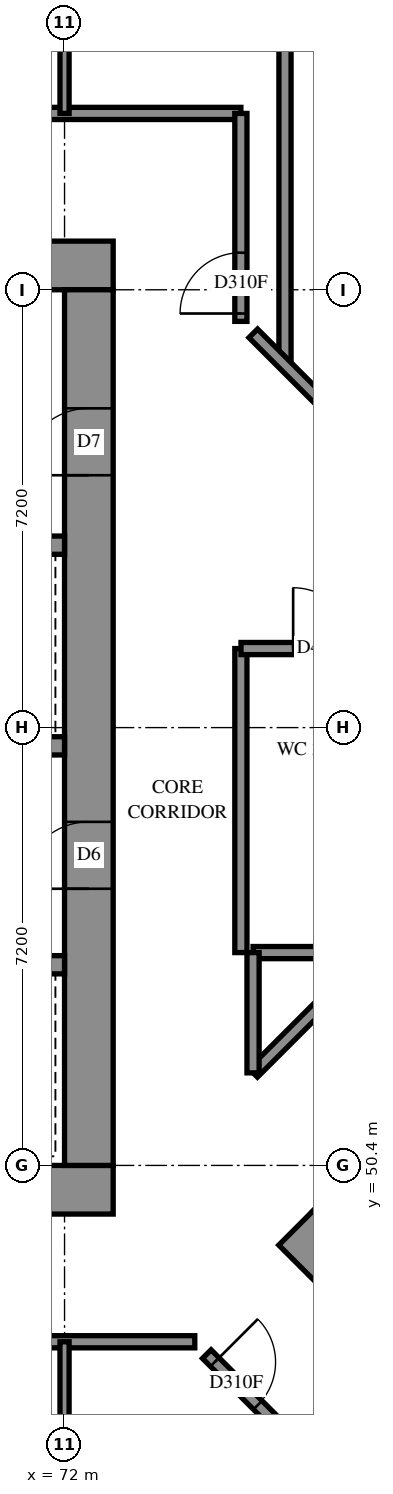
"""IFC4 building model, lengths in metres.
Left out: names, types, materials, properties, quantities, classifications, styles, units other than length and angle.
Written with IfcOpenShell. Run it as: python <this file> out.ifc"""

import sys

from ifc_helpers import new_model, si_unit, direction, frame, frame_2d, origin, place, context, subcontext, project, spatial, rectangle, extrude, element, fill, save


model = new_model("IFC4")
c1 = context("Model", 3, precision=1e-05, world=origin(), true_north=direction((0.0, 1.0)))
c2 = subcontext(c1, "Body", "Model", "MODEL_VIEW")
j1 = project(units=[si_unit("LENGTHUNIT", "METRE"), si_unit("PLANEANGLEUNIT", "RADIAN")], contexts=[c1])
p1 = place(None, origin())
s1 = spatial("IfcSite", under=j1, at=p1, CompositionType="ELEMENT")
p2 = place(p1, origin())
s2 = spatial("IfcBuilding", under=s1, at=p2, CompositionType="ELEMENT")
p3 = place(p2, frame((0.0, 0.0, 118.6)))
s3 = spatial("IfcBuildingStorey", under=s2, at=p3, CompositionType="ELEMENT", Elevation=118.6)
p4 = place(p3, frame((56.8, 50.0, -0.3), z_axis=(0.0, 0.0, 1.0), x_axis=(1.0, 0.0, 0.0)))
e1 = element("IfcWall", 1, at=p4, inside=s3, PredefinedType="SHEAR", context=c2, shape_type="SweptSolid", body=[
    extrude(rectangle(XDim=16.0, YDim=0.8, at=frame_2d((8.0, 0.0))), origin(), (0.0, 0.0, 1.0), 2.7),
])
p5 = place(p3, frame((56.8, 65.2, -0.3), z_axis=(0.0, 0.0, 1.0), x_axis=(1.0, 0.0, 0.0)))
e2 = element("IfcWall", 2, at=p5, inside=s3, PredefinedType="SHEAR", context=c2, shape_type="SweptSolid", body=[
    extrude(rectangle(XDim=16.0, YDim=0.8, at=frame_2d((8.0, 0.0))), origin(), (0.0, 0.0, 1.0), 2.7),
])
p6 = place(p5, frame((10.8, 0.0, 0.3)))
e3 = element("IfcOpeningElement", 3, at=p6, cuts=e2, PredefinedType="OPENING", context=c2, shape_type="SweptSolid", body=[
    extrude(rectangle(XDim=0.8, YDim=2.1, at=frame_2d((0.4, 1.05))), frame((0.0, 0.41, 0.0), z_axis=(0.0, -1.0, 0.0), x_axis=(1.0, 0.0, 0.0)), (0.0, 0.0, 1.0), 0.82),
])
p7 = place(p3, frame((72.4, 50.4, -0.3), z_axis=(0.0, 0.0, 1.0), x_axis=(0.0, 1.0, 0.0)))
e4 = element("IfcWall", 4, at=p7, inside=s3, PredefinedType="SHEAR", context=c2, shape_type="SweptSolid", body=[
    extrude(rectangle(XDim=14.4, YDim=0.8, at=frame_2d((7.2, 0.0))), origin(), (0.0, 0.0, 1.0), 2.7),
])
p8 = place(p7, frame((4.55, 0.0, 0.3)))
e5 = element("IfcOpeningElement", 5, at=p8, cuts=e4, PredefinedType="OPENING", context=c2, shape_type="SweptSolid", body=[
    extrude(rectangle(XDim=1.1, YDim=2.1, at=frame_2d((0.55, 1.05))), frame((0.0, 0.41, 0.0), z_axis=(0.0, -1.0, 0.0), x_axis=(1.0, 0.0, 0.0)), (0.0, 0.0, 1.0), 0.82),
])
p9 = place(p7, frame((11.35, 0.0, 0.3)))
e6 = element("IfcOpeningElement", 6, at=p9, cuts=e4, PredefinedType="OPENING", context=c2, shape_type="SweptSolid", body=[
    extrude(rectangle(XDim=1.1, YDim=2.1, at=frame_2d((0.55, 1.05))), frame((0.0, 0.41, 0.0), z_axis=(0.0, -1.0, 0.0), x_axis=(1.0, 0.0, 0.0)), (0.0, 0.0, 1.0), 0.82),
])
p10 = place(p3, frame((57.6, 53.7, 0.0), z_axis=(0.0, 0.0, 1.0), x_axis=(1.0, 0.0, 0.0)))
e7 = element("IfcWall", 7, at=p10, inside=s3, PredefinedType="SOLIDWALL", context=c2, shape_type="SweptSolid", body=[
    extrude(rectangle(XDim=14.4, YDim=0.3, at=frame_2d((7.2, 0.0))), origin(), (0.0, 0.0, 1.0), 3.1),
])
p11 = place(p10, frame((1.25, 0.0, 0.0)))
e8 = element("IfcOpeningElement", 8, at=p11, cuts=e7, PredefinedType="OPENING", context=c2, shape_type="SweptSolid", body=[
    extrude(rectangle(XDim=1.1, YDim=2.1, at=frame_2d((0.55, 1.05))), frame((0.0, 0.16, 0.0), z_axis=(0.0, -1.0, 0.0), x_axis=(1.0, 0.0, 0.0)), (0.0, 0.0, 1.0), 0.32),
])
p12 = place(p10, frame((4.85, 0.0, 0.0)))
e9 = element("IfcOpeningElement", 9, at=p12, cuts=e7, PredefinedType="OPENING", context=c2, shape_type="SweptSolid", body=[
    extrude(rectangle(XDim=1.1, YDim=2.1, at=frame_2d((0.55, 1.05))), frame((0.0, 0.16, 0.0), z_axis=(0.0, -1.0, 0.0), x_axis=(1.0, 0.0, 0.0)), (0.0, 0.0, 1.0), 0.32),
])
p13 = place(p10, frame((8.45, 0.0, 0.0)))
e10 = element("IfcOpeningElement", 10, at=p13, cuts=e7, PredefinedType="OPENING", context=c2, shape_type="SweptSolid", body=[
    extrude(rectangle(XDim=1.1, YDim=2.1, at=frame_2d((0.55, 1.05))), frame((0.0, 0.16, 0.0), z_axis=(0.0, -1.0, 0.0), x_axis=(1.0, 0.0, 0.0)), (0.0, 0.0, 1.0), 0.32),
])
p14 = place(p10, frame((12.05, 0.0, 0.0)))
e11 = element("IfcOpeningElement", 11, at=p14, cuts=e7, PredefinedType="OPENING", context=c2, shape_type="SweptSolid", body=[
    extrude(rectangle(XDim=1.1, YDim=2.1, at=frame_2d((0.55, 1.05))), frame((0.0, 0.16, 0.0), z_axis=(0.0, -1.0, 0.0), x_axis=(1.0, 0.0, 0.0)), (0.0, 0.0, 1.0), 0.32),
])
p15 = place(p3, frame((57.6, 57.3, 0.0), z_axis=(0.0, 0.0, 1.0), x_axis=(1.0, 0.0, 0.0)))
e12 = element("IfcWall", 12, at=p15, inside=s3, PredefinedType="SOLIDWALL", context=c2, shape_type="SweptSolid", body=[
    extrude(rectangle(XDim=14.4, YDim=0.3, at=frame_2d((7.2, 0.0))), origin(), (0.0, 0.0, 1.0), 3.1),
])
p16 = place(p15, frame((12.05, 0.0, 0.0)))
e13 = element("IfcOpeningElement", 13, at=p16, cuts=e12, PredefinedType="OPENING", context=c2, shape_type="SweptSolid", body=[
    extrude(rectangle(XDim=1.1, YDim=2.1, at=frame_2d((0.55, 1.05))), frame((0.0, 0.16, 0.0), z_axis=(0.0, -1.0, 0.0), x_axis=(1.0, 0.0, 0.0)), (0.0, 0.0, 1.0), 0.32),
])
p17 = place(p3, frame((64.8, 60.6, 0.0), z_axis=(0.0, 0.0, 1.0), x_axis=(1.0, 0.0, 0.0)))
e14 = element("IfcWall", 14, at=p17, inside=s3, PredefinedType="SOLIDWALL", context=c2, shape_type="SweptSolid", body=[
    extrude(rectangle(XDim=7.2, YDim=0.3, at=frame_2d((3.6, 0.0))), origin(), (0.0, 0.0, 1.0), 3.1),
])
p18 = place(p3, frame((75.806, 49.373, -0.3), z_axis=(0.0, 0.0, 1.0), x_axis=(0.7071067812, -0.7071067812, 0.0)))
e15 = element("IfcWall", 15, at=p18, inside=s3, PredefinedType="SHEAR", context=c2, shape_type="SweptSolid", body=[
    extrude(rectangle(XDim=16.0, YDim=0.8, at=frame_2d((8.0, 0.0))), origin(), (0.0, 0.0, 1.0), 2.7),
])
p19 = place(p3, frame((76.372, 49.373, -0.3), z_axis=(0.0, 0.0, 1.0), x_axis=(0.7071067812, 0.7071067812, 0.0)))
e16 = element("IfcWall", 16, at=p19, inside=s3, PredefinedType="SHEAR", context=c2, shape_type="SweptSolid", body=[
    extrude(rectangle(XDim=14.4, YDim=0.8, at=frame_2d((7.2, 0.0))), origin(), (0.0, 0.0, 1.0), 2.7),
])
p20 = place(p19, frame((4.55, 0.0, 0.3)))
e17 = element("IfcOpeningElement", 17, at=p20, cuts=e16, PredefinedType="OPENING", context=c2, shape_type="SweptSolid", body=[
    extrude(rectangle(XDim=1.1, YDim=2.1, at=frame_2d((0.55, 1.05))), frame((0.0, 0.41, 0.0), z_axis=(0.0, -1.0, 0.0), x_axis=(1.0, 0.0, 0.0)), (0.0, 0.0, 1.0), 0.82),
])
p21 = place(p19, frame((11.35, 0.0, 0.3)))
e18 = element("IfcOpeningElement", 18, at=p21, cuts=e16, PredefinedType="OPENING", context=c2, shape_type="SweptSolid", body=[
    extrude(rectangle(XDim=1.1, YDim=2.1, at=frame_2d((0.55, 1.05))), frame((0.0, 0.41, 0.0), z_axis=(0.0, -1.0, 0.0), x_axis=(1.0, 0.0, 0.0)), (0.0, 0.0, 1.0), 0.82),
])
p22 = place(p3, frame((54.7, 67.7, 0.0), z_axis=(0.0, 0.0, 1.0), x_axis=(1.0, 0.0, 0.0)))
e19 = element("IfcWall", 19, at=p22, inside=s3, PredefinedType="PARTITIONING", context=c2, shape_type="SweptSolid", body=[
    extrude(rectangle(XDim=20.2, YDim=0.2, at=frame_2d((10.1, 0.0))), origin(), (0.0, 0.0, 1.0), 3.1),
])
p23 = place(p22, frame((5.2, 0.0, 0.0)))
e20 = element("IfcOpeningElement", 20, at=p23, cuts=e19, PredefinedType="OPENING", context=c2, shape_type="SweptSolid", body=[
    extrude(rectangle(XDim=0.9, YDim=2.1, at=frame_2d((0.45, 1.05))), frame((0.0, 0.11, 0.0), z_axis=(0.0, -1.0, 0.0), x_axis=(1.0, 0.0, 0.0)), (0.0, 0.0, 1.0), 0.22),
])
p24 = place(p22, frame((8.838, 0.0, 0.0)))
e21 = element("IfcOpeningElement", 21, at=p24, cuts=e19, PredefinedType="OPENING", context=c2, shape_type="SweptSolid", body=[
    extrude(rectangle(XDim=1.0, YDim=2.1, at=frame_2d((0.5, 1.05))), frame((0.0, 0.11, 0.0), z_axis=(0.0, -1.0, 0.0), x_axis=(1.0, 0.0, 0.0)), (0.0, 0.0, 1.0), 0.22),
])
p25 = place(p22, frame((14.1, 0.0, 0.0)))
e22 = element("IfcOpeningElement", 22, at=p25, cuts=e19, PredefinedType="OPENING", context=c2, shape_type="SweptSolid", body=[
    extrude(rectangle(XDim=0.9, YDim=2.1, at=frame_2d((0.45, 1.05))), frame((0.0, 0.11, 0.0), z_axis=(0.0, -1.0, 0.0), x_axis=(1.0, 0.0, 0.0)), (0.0, 0.0, 1.0), 0.22),
])
p26 = place(p3, frame((54.7, 47.5, 0.0), z_axis=(0.0, 0.0, 1.0), x_axis=(1.0, 0.0, 0.0)))
e23 = element("IfcWall", 23, at=p26, inside=s3, PredefinedType="PARTITIONING", context=c2, shape_type="SweptSolid", body=[
    extrude(rectangle(XDim=19.442, YDim=0.2, at=frame_2d((9.721, 0.0))), origin(), (0.0, 0.0, 1.0), 3.1),
])
p27 = place(p26, frame((5.2, 0.0, 0.0)))
e24 = element("IfcOpeningElement", 24, at=p27, cuts=e23, PredefinedType="OPENING", context=c2, shape_type="SweptSolid", body=[
    extrude(rectangle(XDim=0.9, YDim=2.1, at=frame_2d((0.45, 1.05))), frame((0.0, 0.11, 0.0), z_axis=(0.0, -1.0, 0.0), x_axis=(1.0, 0.0, 0.0)), (0.0, 0.0, 1.0), 0.22),
])
p28 = place(p26, frame((8.757, 0.0, 0.0)))
e25 = element("IfcOpeningElement", 25, at=p28, cuts=e23, PredefinedType="OPENING", context=c2, shape_type="SweptSolid", body=[
    extrude(rectangle(XDim=0.9, YDim=2.1, at=frame_2d((0.45, 1.05))), frame((0.0, 0.11, 0.0), z_axis=(0.0, -1.0, 0.0), x_axis=(1.0, 0.0, 0.0)), (0.0, 0.0, 1.0), 0.22),
])
p29 = place(p26, frame((14.05, 0.0, 0.0)))
e26 = element("IfcOpeningElement", 26, at=p29, cuts=e23, PredefinedType="OPENING", context=c2, shape_type="SweptSolid", body=[
    extrude(rectangle(XDim=0.9, YDim=2.1, at=frame_2d((0.45, 1.05))), frame((0.0, 0.11, 0.0), z_axis=(0.0, -1.0, 0.0), x_axis=(1.0, 0.0, 0.0)), (0.0, 0.0, 1.0), 0.22),
])
p30 = place(p3, frame((75.625, 63.562, 0.0), z_axis=(0.0, 0.0, 1.0), x_axis=(0.0, 1.0, 0.0)))
e27 = element("IfcWall", 27, at=p30, inside=s3, PredefinedType="PARTITIONING", context=c2, shape_type="SweptSolid", body=[
    extrude(rectangle(XDim=9.208, YDim=0.2, at=frame_2d((4.604, 0.0))), origin(), (0.0, 0.0, 1.0), 3.1),
])
p31 = place(p3, frame((74.9, 53.9, 0.0), z_axis=(0.0, 0.0, 1.0), x_axis=(0.0, 1.0, 0.0)))
e28 = element("IfcWall", 28, at=p31, inside=s3, PredefinedType="PARTITIONING", context=c2, shape_type="SweptSolid", body=[
    extrude(rectangle(XDim=5.0, YDim=0.2, at=frame_2d((2.5, 0.0))), origin(), (0.0, 0.0, 1.0), 3.1),
])
p32 = place(p3, frame((75.103, 64.083, 0.0), z_axis=(0.0, 0.0, 1.0), x_axis=(0.7071067812, -0.7071067812, 0.0)))
e29 = element("IfcWall", 29, at=p32, inside=s3, PredefinedType="PARTITIONING", context=c2, shape_type="SweptSolid", body=[
    extrude(rectangle(XDim=4.214, YDim=0.2, at=frame_2d((2.107, 0.0))), origin(), (0.0, 0.0, 1.0), 3.1),
])
p33 = place(p32, frame((2.979, 0.0, 0.0)))
e30 = element("IfcOpeningElement", 30, at=p33, cuts=e29, PredefinedType="OPENING", context=c2, shape_type="SweptSolid", body=[
    extrude(rectangle(XDim=1.0, YDim=2.1, at=frame_2d((0.5, 1.05))), frame((0.0, 0.11, 0.0), z_axis=(0.0, -1.0, 0.0), x_axis=(1.0, 0.0, 0.0)), (0.0, 0.0, 1.0), 0.22),
])
p34 = place(p3, frame((74.9, 64.28, 0.0), z_axis=(0.0, 0.0, 1.0), x_axis=(0.0, 1.0, 0.0)))
e31 = element("IfcWall", 31, at=p34, inside=s3, PredefinedType="PARTITIONING", context=c2, shape_type="SweptSolid", body=[
    extrude(rectangle(XDim=3.42, YDim=0.2, at=frame_2d((1.71, 0.0))), origin(), (0.0, 0.0, 1.0), 3.1),
])
p35 = place(p34, frame((0.13, 0.0, 0.0)))
e32 = element("IfcOpeningElement", 32, at=p35, cuts=e31, PredefinedType="OPENING", context=c2, shape_type="SweptSolid", body=[
    extrude(rectangle(XDim=1.0, YDim=2.1, at=frame_2d((0.5, 1.05))), frame((0.0, 0.11, 0.0), z_axis=(0.0, -1.0, 0.0), x_axis=(1.0, 0.0, 0.0)), (0.0, 0.0, 1.0), 0.22),
])
p36 = place(p3, frame((75.102, 51.922, 0.0), z_axis=(0.0, 0.0, 1.0), x_axis=(0.7071067812, 0.7071067812, 0.0)))
e33 = element("IfcWall", 33, at=p36, inside=s3, PredefinedType="PARTITIONING", context=c2, shape_type="SweptSolid", body=[
    extrude(rectangle(XDim=2.797, YDim=0.2, at=frame_2d((1.399, 0.0))), origin(), (0.0, 0.0, 1.0), 3.1),
])
for number, where, z_axis, x_axis in (
    (34, (72.0, 45.1, 0.0), (0.0, 0.0, 1.0), (0.0, 1.0, 0.0)),
    (35, (72.0, 67.7, 0.0), (0.0, 0.0, 1.0), (0.0, 1.0, 0.0)),
):
    element("IfcWall", number, at=place(p3, frame(where, z_axis=z_axis, x_axis=x_axis)), inside=s3, PredefinedType="PARTITIONING", context=c2, shape_type="SweptSolid", body=[
        extrude(rectangle(XDim=2.4, YDim=0.15, at=frame_2d((1.2, 0.0))), origin(), (0.0, 0.0, 1.0), 3.1),
    ])
p37 = place(p3, frame((74.902, 58.9, 0.0), z_axis=(0.0, 0.0, 1.0), x_axis=(1.0, 0.0, 0.0)))
e36 = element("IfcWall", 36, at=p37, inside=s3, PredefinedType="PARTITIONING", context=c2, shape_type="SweptSolid", body=[
    extrude(rectangle(XDim=2.266, YDim=0.2, at=frame_2d((1.133, 0.0))), origin(), (0.0, 0.0, 1.0), 3.1),
])
p38 = place(p37, frame((0.858, 0.0, 0.0)))
e37 = element("IfcOpeningElement", 37, at=p38, cuts=e36, PredefinedType="OPENING", context=c2, shape_type="SweptSolid", body=[
    extrude(rectangle(XDim=1.0, YDim=2.1, at=frame_2d((0.5, 1.05))), frame((0.0, 0.11, 0.0), z_axis=(0.0, -1.0, 0.0), x_axis=(1.0, 0.0, 0.0)), (0.0, 0.0, 1.0), 0.22),
])
p39 = place(p3, frame((75.1, 53.9, 0.0), z_axis=(0.0, 0.0, 1.0), x_axis=(1.0, 0.0, 0.0)))
e38 = element("IfcWall", 38, at=p39, inside=s3, PredefinedType="PARTITIONING", context=c2, shape_type="SweptSolid", body=[
    extrude(rectangle(XDim=1.98, YDim=0.2, at=frame_2d((0.99, 0.0))), origin(), (0.0, 0.0, 1.0), 3.1),
])
p40 = place(p3, frame((75.1, 51.922, 0.0), z_axis=(0.0, 0.0, 1.0), x_axis=(0.0, 1.0, 0.0)))
e39 = element("IfcWall", 39, at=p40, inside=s3, PredefinedType="PARTITIONING", context=c2, shape_type="SweptSolid", body=[
    extrude(rectangle(XDim=1.978, YDim=0.2, at=frame_2d((0.989, 0.0))), origin(), (0.0, 0.0, 1.0), 3.1),
])
p41 = place(p3, frame((74.339, 47.297, 0.0), z_axis=(0.0, 0.0, 1.0), x_axis=(0.7071067812, -0.7071067812, 0.0)))
e40 = element("IfcWall", 40, at=p41, inside=s3, PredefinedType="PARTITIONING", context=c2, shape_type="SweptSolid", body=[
    extrude(rectangle(XDim=1.779, YDim=0.2, at=frame_2d((0.889, 0.0))), origin(), (0.0, 0.0, 1.0), 3.1),
])
p42 = place(p41, frame((0.186, 0.0, 0.0)))
e41 = element("IfcOpeningElement", 41, at=p42, cuts=e40, PredefinedType="OPENING", context=c2, shape_type="SweptSolid", body=[
    extrude(rectangle(XDim=1.0, YDim=2.1, at=frame_2d((0.5, 1.05))), frame((0.0, 0.11, 0.0), z_axis=(0.0, -1.0, 0.0), x_axis=(1.0, 0.0, 0.0)), (0.0, 0.0, 1.0), 0.22),
])
p43 = place(p8, origin())
e42 = element("IfcDoor", 42, at=p43, inside=s3, OperationType="DOUBLE_DOOR_SINGLE_SWING", PredefinedType="DOOR", context=c2, shape_type="SweptSolid", body=[
    extrude(rectangle(XDim=1.1, YDim=2.1, at=frame_2d((0.55, 1.05))), frame((0.0, 0.025, 0.0), z_axis=(0.0, -1.0, 0.0), x_axis=(1.0, 0.0, 0.0)), (0.0, 0.0, 1.0), 0.05),
])
fill(e5, e42)
p44 = place(p9, origin())
e43 = element("IfcDoor", 43, at=p44, inside=s3, OperationType="SINGLE_SWING_RIGHT", PredefinedType="DOOR", context=c2, shape_type="SweptSolid", body=[
    extrude(rectangle(XDim=1.1, YDim=2.1, at=frame_2d((0.55, 1.05))), frame((0.0, 0.025, 0.0), z_axis=(0.0, -1.0, 0.0), x_axis=(1.0, 0.0, 0.0)), (0.0, 0.0, 1.0), 0.05),
])
fill(e6, e43)
p45 = place(p38, origin())
e44 = element("IfcDoor", 44, at=p45, inside=s3, OperationType="SINGLE_SWING_RIGHT", PredefinedType="DOOR", context=c2, shape_type="SweptSolid", body=[
    extrude(rectangle(XDim=1.0, YDim=2.1, at=frame_2d((0.5, 1.05))), frame((0.0, 0.025, 0.0), z_axis=(0.0, -1.0, 0.0), x_axis=(1.0, 0.0, 0.0)), (0.0, 0.0, 1.0), 0.05),
])
fill(e37, e44)
p46 = place(p42, origin())
e45 = element("IfcDoor", 45, at=p46, inside=s3, OperationType="SINGLE_SWING_LEFT", PredefinedType="DOOR", context=c2, shape_type="SweptSolid", body=[
    extrude(rectangle(XDim=1.0, YDim=2.1, at=frame_2d((0.5, 1.05))), frame((0.0, 0.025, 0.0), z_axis=(0.0, -1.0, 0.0), x_axis=(1.0, 0.0, 0.0)), (0.0, 0.0, 1.0), 0.05),
])
fill(e41, e45)
p47 = place(p35, origin())
e46 = element("IfcDoor", 46, at=p47, inside=s3, OperationType="SINGLE_SWING_RIGHT", PredefinedType="DOOR", context=c2, shape_type="SweptSolid", body=[
    extrude(rectangle(XDim=1.0, YDim=2.1, at=frame_2d((0.5, 1.05))), frame((0.0, 0.025, 0.0), z_axis=(0.0, -1.0, 0.0), x_axis=(1.0, 0.0, 0.0)), (0.0, 0.0, 1.0), 0.05),
])
fill(e32, e46)
save(model, sys.argv[1])
